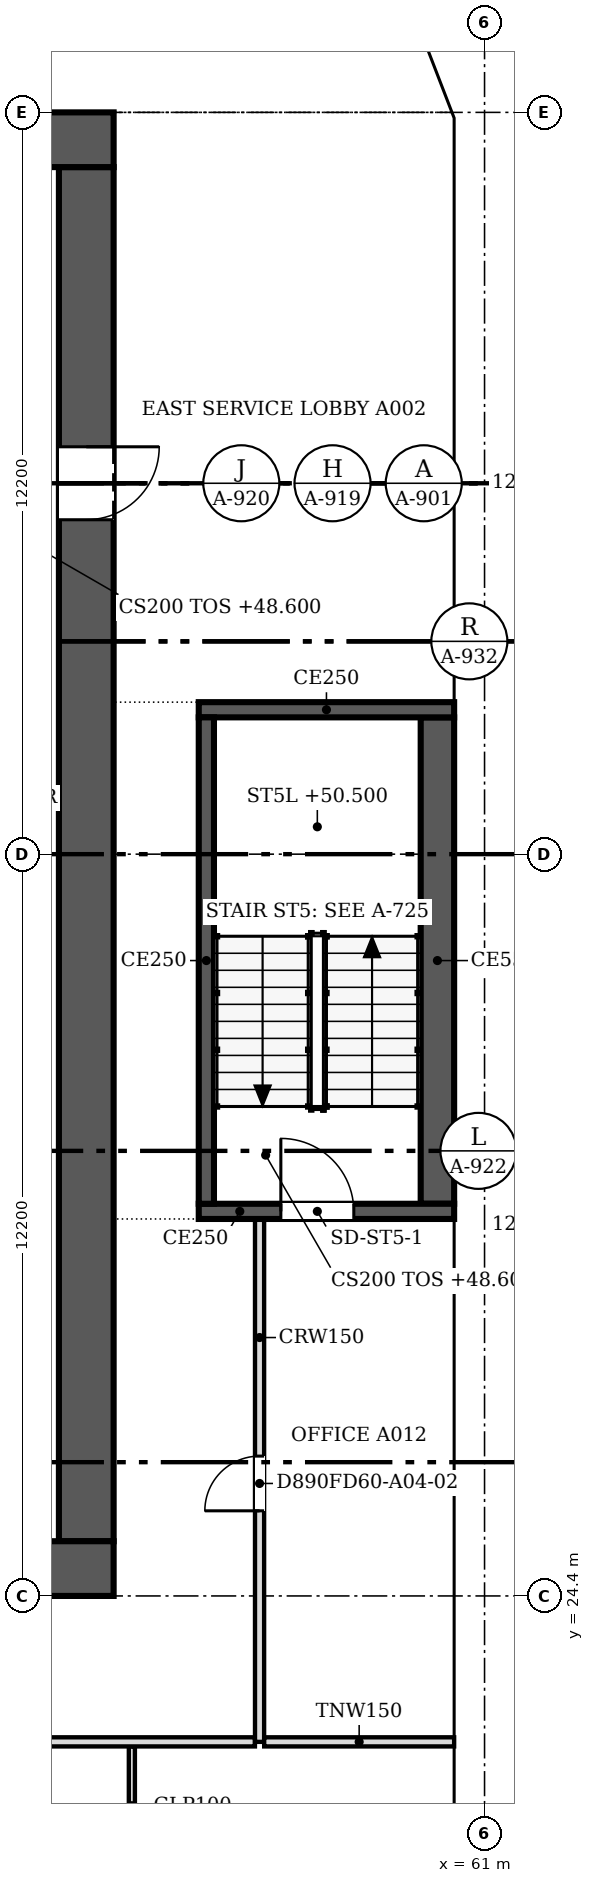
"""IFC4 building model, lengths in metres.
Left out: names, types, materials, properties, quantities, classifications, styles, units other than length and angle.
Written with IfcOpenShell. Run it as: python <this file> out.ifc"""

import sys

from ifc_helpers import new_model, si_unit, direction, frame, frame_2d, origin, place, context, subcontext, project, spatial, polyline, rectangle, outline, extrude, faceted_brep, source, transform, mapped, element, fill, save


model = new_model("IFC4")
c1 = context("Model", 3, precision=1e-05, world=origin(), true_north=direction((0.0, 1.0)))
c2 = subcontext(c1, "Body", "Model", "MODEL_VIEW")
j1 = project(units=[si_unit("LENGTHUNIT", "METRE"), si_unit("PLANEANGLEUNIT", "RADIAN")], contexts=[c1])
p1 = place(None, origin())
s1 = spatial("IfcSite", under=j1, at=p1, CompositionType="ELEMENT")
p2 = place(p1, origin())
s2 = spatial("IfcBuilding", under=s1, at=p2, CompositionType="ELEMENT")
p3 = place(p2, frame((0.0, 0.0, 48.6)))
s3 = spatial("IfcBuildingStorey", under=s2, at=p3, CompositionType="ELEMENT", Elevation=48.6)
m1 = source(origin(), c2, "Body", "Brep", [
    faceted_brep([(3.05, -0.25, 0.0), (6.1, -0.25, 3.8), (6.1, -0.25, 3.8), (3.05, -0.25, 7.6), (0.0, -0.25, 3.8), (0.0, 0.25, 3.8), (3.05, 0.25, 7.6), (6.1, 0.25, 3.8), (6.1, 0.25, 3.8), (3.05, 0.25, 0.0)], [[[0, 1, 2, 3, 4]], [[5, 6, 7, 8, 9]], [[9, 8, 1, 0]], [[7, 6, 3, 2]], [[6, 5, 4, 3]], [[5, 9, 0, 4]], [[1, 8, 7, 2]]]),
])
p4 = place(p3, frame((60.75, 18.3, -3.8), z_axis=(0.0, 0.0, 1.0), x_axis=(0.0, 1.0, 0.0)))
e1 = element("IfcWall", 1, at=p4, inside=s3, PredefinedType="SOLIDWALL", context=c2, shape_type="MappedRepresentation", body=[
    mapped(m1, transform((0.0, 0.0, 0.0), scale=1.0)),
])
m2 = source(origin(), c2, "Body", "SweptSolid", [
    extrude(outline(polyline([(3.05, 0.399), (5.78, 3.8), (3.05, 7.2), (0.321, 3.8), (3.05, 0.399)])), frame((0.0, 0.26, 0.0), z_axis=(0.0, -1.0, 0.0), x_axis=(1.0, 0.0, 0.0)), (0.0, 0.0, 1.0), 0.52),
])
p5 = place(p4, origin())
e2 = element("IfcOpeningElement", 2, at=p5, cuts=e1, PredefinedType="OPENING", context=c2, shape_type="MappedRepresentation", body=[
    mapped(m2, transform((0.0, 0.0, 0.0), scale=1.0)),
])
m3 = source(origin(), c2, "Body", "SweptSolid", [
    extrude(outline(polyline([(3.05, 0.0), (6.1, 3.8), (3.05, 7.6), (0.0, 3.8), (3.05, 0.0)])), frame((0.0, 0.25, 0.0), z_axis=(0.0, -1.0, 0.0), x_axis=(1.0, 0.0, 0.0)), (0.0, 0.0, 1.0), 0.5),
])
p6 = place(p3, frame((60.75, 24.4, -3.8), z_axis=(0.0, 0.0, 1.0), x_axis=(0.0, 1.0, 0.0)))
e3 = element("IfcWall", 3, at=p6, inside=s3, PredefinedType="SOLIDWALL", context=c2, shape_type="MappedRepresentation", body=[
    mapped(m3, transform((0.0, 0.0, 0.0), scale=1.0)),
])
p7 = place(p6, origin())
e4 = element("IfcOpeningElement", 4, at=p7, cuts=e3, PredefinedType="OPENING", context=c2, shape_type="MappedRepresentation", body=[
    mapped(m2, transform((0.0, 0.0, 0.0), scale=1.0)),
])
p8 = place(p3, frame((60.75, 30.5, -3.8), z_axis=(0.0, 0.0, 1.0), x_axis=(0.0, 1.0, 0.0)))
e5 = element("IfcWall", 5, at=p8, inside=s3, PredefinedType="SOLIDWALL", context=c2, shape_type="MappedRepresentation", body=[
    mapped(m3, transform((0.0, 0.0, 0.0), scale=1.0)),
])
p9 = place(p8, origin())
e6 = element("IfcOpeningElement", 6, at=p9, cuts=e5, PredefinedType="OPENING", context=c2, shape_type="MappedRepresentation", body=[
    mapped(m2, transform((0.0, 0.0, 0.0), scale=1.0)),
])
p10 = place(p3, frame((60.75, 36.6, -3.8), z_axis=(0.0, 0.0, 1.0), x_axis=(0.0, 1.0, 0.0)))
e7 = element("IfcWall", 7, at=p10, inside=s3, PredefinedType="SOLIDWALL", context=c2, shape_type="MappedRepresentation", body=[
    mapped(m1, transform((0.0, 0.0, 0.0), scale=1.0)),
])
p11 = place(p10, origin())
e8 = element("IfcOpeningElement", 8, at=p11, cuts=e7, PredefinedType="OPENING", context=c2, shape_type="MappedRepresentation", body=[
    mapped(m2, transform((0.0, 0.0, 0.0), scale=1.0)),
])
m4 = source(origin(), c2, "Body", "Brep", [
    faceted_brep([(3.05, -0.25, 0.0), (6.053, -0.25, 3.8), (3.05, -0.25, 7.6), (0.0, -0.25, 3.8), (0.0, 0.25, 3.8), (3.05, 0.25, 7.6), (6.007, 0.25, 3.859), (6.007, 0.25, 3.741), (3.05, 0.25, 0.0), (6.053, 0.0, 3.8)], [[[0, 1, 2, 3]], [[4, 5, 6, 7, 8]], [[8, 7, 9, 1, 0]], [[6, 5, 2, 1, 9]], [[5, 4, 3, 2]], [[4, 8, 0, 3]], [[7, 6, 9]]]),
])
p12 = place(p3, frame((60.75, 42.7, -3.8), z_axis=(0.0, 0.0, 1.0), x_axis=(0.0, 1.0, 0.0)))
e9 = element("IfcWall", 9, at=p12, inside=s3, PredefinedType="SOLIDWALL", context=c2, shape_type="MappedRepresentation", body=[
    mapped(m4, transform((0.0, 0.0, 0.0), scale=1.0)),
])
m5 = source(origin(), c2, "Body", "SweptSolid", [
    extrude(outline(polyline([(3.049, 0.401), (5.735, 3.8), (3.049, 7.199), (0.321, 3.8), (3.049, 0.401)])), frame((0.0, 0.26, 0.0), z_axis=(0.0, -1.0, 0.0), x_axis=(1.0, 0.0, 0.0)), (0.0, 0.0, 1.0), 0.52),
])
p13 = place(p12, origin())
e10 = element("IfcOpeningElement", 10, at=p13, cuts=e9, PredefinedType="OPENING", context=c2, shape_type="MappedRepresentation", body=[
    mapped(m5, transform((0.0, 0.0, 0.0), scale=1.0)),
])
m6 = source(origin(), c2, "Body", "Brep", [
    faceted_brep([(2.95, -0.25, 0.0), (3.003, -0.25, 0.068), (3.003, -0.25, 7.531), (2.95, -0.25, 7.6), (0.0, -0.25, 3.8), (0.047, 0.25, 3.86), (2.898, 0.25, 7.532), (2.898, 0.25, 0.068), (0.047, 0.25, 3.74), (2.95, 0.0, 0.0), (2.95, 0.0, 7.6), (0.0, 0.0, 3.8)], [[[0, 1, 2, 3, 4]], [[5, 6, 7, 8]], [[1, 0, 9]], [[10, 3, 2]], [[6, 5, 11, 4, 3, 10]], [[8, 7, 9, 0, 4, 11]], [[8, 11, 5]], [[1, 9, 7, 6, 10, 2]]]),
])
p14 = place(p3, frame((60.75, 48.753, -3.8), z_axis=(0.0, 0.0, 1.0), x_axis=(-0.35992665181, 0.932980602862, 0.0)))
e11 = element("IfcWall", 11, at=p14, inside=s3, PredefinedType="SOLIDWALL", context=c2, shape_type="MappedRepresentation", body=[
    mapped(m6, transform((0.0, 0.0, 0.0), scale=1.0)),
])
m7 = source(origin(), c2, "Body", "SweptSolid", [
    extrude(outline(polyline([(2.75, 6.935), (0.316, 3.8), (2.75, 0.665), (2.75, 6.935)])), frame((0.0, 0.26, 0.0), z_axis=(0.0, -1.0, 0.0), x_axis=(1.0, 0.0, 0.0)), (0.0, 0.0, 1.0), 0.52),
])
p15 = place(p14, origin())
e12 = element("IfcOpeningElement", 12, at=p15, cuts=e11, PredefinedType="OPENING", context=c2, shape_type="MappedRepresentation", body=[
    mapped(m7, transform((0.0, 0.0, 0.0), scale=1.0)),
])
p16 = place(p2, frame((0.0, 0.0, 52.4)))
s4 = spatial("IfcBuildingStorey", under=s2, at=p16, CompositionType="ELEMENT", Elevation=52.4)
m8 = source(origin(), c2, "Body", "SweptSolid", [
    extrude(outline(polyline([(3.05, 0.0), (6.1, 3.8), (3.05, 7.6), (0.0, 3.8), (3.05, 0.0)])), frame((0.0, 0.25, 0.0), z_axis=(0.0, -1.0, 0.0), x_axis=(1.0, 0.0, 0.0)), (0.0, 0.0, 1.0), 0.5),
])
p17 = place(p16, frame((60.75, 15.25, -3.8), z_axis=(0.0, 0.0, 1.0), x_axis=(0.0, 1.0, 0.0)))
e13 = element("IfcWall", 13, at=p17, inside=s4, PredefinedType="SOLIDWALL", context=c2, shape_type="MappedRepresentation", body=[
    mapped(m8, transform((0.0, 0.0, 0.0), scale=1.0)),
])
m9 = source(origin(), c2, "Body", "SweptSolid", [
    extrude(outline(polyline([(3.05, 0.399), (5.78, 3.8), (3.05, 7.2), (0.321, 3.8), (3.05, 0.399)])), frame((0.0, 0.26, 0.0), z_axis=(0.0, -1.0, 0.0), x_axis=(1.0, 0.0, 0.0)), (0.0, 0.0, 1.0), 0.52),
])
p18 = place(p17, origin())
e14 = element("IfcOpeningElement", 14, at=p18, cuts=e13, PredefinedType="OPENING", context=c2, shape_type="MappedRepresentation", body=[
    mapped(m9, transform((0.0, 0.0, 0.0), scale=1.0)),
])
m10 = source(origin(), c2, "Body", "Brep", [
    faceted_brep([(3.05, -0.25, 0.0), (6.1, -0.25, 3.8), (6.1, -0.25, 3.8), (3.05, -0.25, 7.6), (0.0, -0.25, 3.8), (0.0, 0.25, 3.8), (3.05, 0.25, 7.6), (6.1, 0.25, 3.8), (6.1, 0.25, 3.8), (3.05, 0.25, 0.0)], [[[0, 1, 2, 3, 4]], [[5, 6, 7, 8, 9]], [[9, 8, 1, 0]], [[7, 6, 3, 2]], [[6, 5, 4, 3]], [[5, 9, 0, 4]], [[1, 8, 7, 2]]]),
])
p19 = place(p16, frame((60.75, 21.35, -3.8), z_axis=(0.0, 0.0, 1.0), x_axis=(0.0, 1.0, 0.0)))
e15 = element("IfcWall", 15, at=p19, inside=s4, PredefinedType="SOLIDWALL", context=c2, shape_type="MappedRepresentation", body=[
    mapped(m10, transform((0.0, 0.0, 0.0), scale=1.0)),
])
p20 = place(p19, origin())
e16 = element("IfcOpeningElement", 16, at=p20, cuts=e15, PredefinedType="OPENING", context=c2, shape_type="MappedRepresentation", body=[
    mapped(m9, transform((0.0, 0.0, 0.0), scale=1.0)),
])
p21 = place(p16, frame((60.75, 27.45, -3.8), z_axis=(0.0, 0.0, 1.0), x_axis=(0.0, 1.0, 0.0)))
e17 = element("IfcWall", 17, at=p21, inside=s4, PredefinedType="SOLIDWALL", context=c2, shape_type="MappedRepresentation", body=[
    mapped(m8, transform((0.0, 0.0, 0.0), scale=1.0)),
])
p22 = place(p21, origin())
e18 = element("IfcOpeningElement", 18, at=p22, cuts=e17, PredefinedType="OPENING", context=c2, shape_type="MappedRepresentation", body=[
    mapped(m9, transform((0.0, 0.0, 0.0), scale=1.0)),
])
p23 = place(p16, frame((60.75, 33.55, -3.8), z_axis=(0.0, 0.0, 1.0), x_axis=(0.0, 1.0, 0.0)))
e19 = element("IfcWall", 19, at=p23, inside=s4, PredefinedType="SOLIDWALL", context=c2, shape_type="MappedRepresentation", body=[
    mapped(m10, transform((0.0, 0.0, 0.0), scale=1.0)),
])
p24 = place(p23, origin())
e20 = element("IfcOpeningElement", 20, at=p24, cuts=e19, PredefinedType="OPENING", context=c2, shape_type="MappedRepresentation", body=[
    mapped(m9, transform((0.0, 0.0, 0.0), scale=1.0)),
])
p25 = place(p16, frame((60.75, 39.65, -3.8), z_axis=(0.0, 0.0, 1.0), x_axis=(0.0, 1.0, 0.0)))
e21 = element("IfcWall", 21, at=p25, inside=s4, PredefinedType="SOLIDWALL", context=c2, shape_type="MappedRepresentation", body=[
    mapped(m8, transform((0.0, 0.0, 0.0), scale=1.0)),
])
p26 = place(p25, origin())
e22 = element("IfcOpeningElement", 22, at=p26, cuts=e21, PredefinedType="OPENING", context=c2, shape_type="MappedRepresentation", body=[
    mapped(m9, transform((0.0, 0.0, 0.0), scale=1.0)),
])
m11 = source(origin(), c2, "Body", "Brep", [
    faceted_brep([(3.003, -0.25, 0.0), (3.05, -0.25, 0.06), (3.05, -0.25, 7.54), (3.003, -0.25, 7.6), (0.0, -0.25, 3.8), (0.0, 0.25, 3.8), (2.957, 0.25, 7.541), (2.957, 0.25, 0.059), (3.003, 0.0, 0.0), (3.003, 0.0, 7.6)], [[[0, 1, 2, 3, 4]], [[5, 6, 7]], [[1, 0, 8]], [[9, 3, 2]], [[6, 5, 4, 3, 9]], [[5, 7, 8, 0, 4]], [[1, 8, 7, 6, 9, 2]]]),
])
p27 = place(p16, frame((60.75, 45.75, -3.8), z_axis=(0.0, 0.0, 1.0), x_axis=(0.0, 1.0, 0.0)))
e23 = element("IfcWall", 23, at=p27, inside=s4, PredefinedType="SOLIDWALL", context=c2, shape_type="MappedRepresentation", body=[
    mapped(m11, transform((0.0, 0.0, 0.0), scale=1.0)),
])
m12 = source(origin(), c2, "Body", "SweptSolid", [
    extrude(outline(polyline([(2.803, 6.944), (0.319, 3.8), (2.803, 0.656), (2.803, 6.944)])), frame((0.0, 0.26, 0.0), z_axis=(0.0, -1.0, 0.0), x_axis=(1.0, 0.0, 0.0)), (0.0, 0.0, 1.0), 0.52),
])
p28 = place(p27, origin())
e24 = element("IfcOpeningElement", 24, at=p28, cuts=e23, PredefinedType="OPENING", context=c2, shape_type="MappedRepresentation", body=[
    mapped(m12, transform((0.0, 0.0, 0.0), scale=1.0)),
])
m13 = source(origin(), c2, "Body", "Brep", [
    faceted_brep([(0.047, -0.25, 0.0), (2.997, -0.25, 3.8), (0.047, -0.25, 7.6), (0.0, -0.25, 7.541), (0.0, -0.25, 0.059), (0.093, 0.25, 7.54), (2.944, 0.25, 3.868), (2.944, 0.25, 3.732), (0.093, 0.25, 0.06), (2.997, 0.0, 3.8), (0.047, 0.0, 0.0), (0.047, 0.0, 7.6)], [[[0, 1, 2, 3, 4]], [[5, 6, 7, 8]], [[8, 7, 9, 1, 0, 10]], [[6, 5, 11, 2, 1, 9]], [[3, 2, 11]], [[10, 0, 4]], [[8, 10, 4, 3, 11, 5]], [[9, 7, 6]]]),
])
p29 = place(p16, frame((60.767, 48.71, -3.8), z_axis=(0.0, 0.0, 1.0), x_axis=(-0.359901446078, 0.932990326376, 0.0)))
e25 = element("IfcWall", 25, at=p29, inside=s4, PredefinedType="SOLIDWALL", context=c2, shape_type="MappedRepresentation", body=[
    mapped(m13, transform((0.0, 0.0, 0.0), scale=1.0)),
])
m14 = source(origin(), c2, "Body", "SweptSolid", [
    extrude(outline(polyline([(0.247, 0.665), (2.681, 3.8), (0.247, 6.935), (0.247, 0.665)])), frame((0.0, 0.26, 0.0), z_axis=(0.0, -1.0, 0.0), x_axis=(1.0, 0.0, 0.0)), (0.0, 0.0, 1.0), 0.52),
])
p30 = place(p29, origin())
e26 = element("IfcOpeningElement", 26, at=p30, cuts=e25, PredefinedType="OPENING", context=c2, shape_type="MappedRepresentation", body=[
    mapped(m14, transform((0.0, 0.0, 0.0), scale=1.0)),
])
p31 = place(p3, frame((54.9, 24.85, 0.0), z_axis=(0.0, 0.0, 1.0), x_axis=(-1.0, 0.0, 0.0)))
e27 = element("IfcWall", 27, at=p31, inside=s3, PredefinedType="SHEAR", context=c2, shape_type="SweptSolid", body=[
    extrude(rectangle(XDim=24.4, YDim=0.9, at=frame_2d((12.2, 0.0))), origin(), (0.0, 0.0, 1.0), 3.8),
])
m15 = source(origin(), c2, "Body", "SweptSolid", [
    extrude(rectangle(XDim=1.2, YDim=2.1, at=frame_2d((0.6, 1.05))), frame((0.0, 0.46, 0.0), z_axis=(0.0, -1.0, 0.0), x_axis=(1.0, 0.0, 0.0)), (0.0, 0.0, 1.0), 0.92),
])
p32 = place(p31, frame((1.5, 0.0, 0.0)))
e28 = element("IfcOpeningElement", 28, at=p32, cuts=e27, PredefinedType="OPENING", context=c2, shape_type="MappedRepresentation", body=[
    mapped(m15, transform((0.0, 0.0, 0.0), scale=1.0)),
])
p33 = place(p3, frame((30.5, 48.35, 0.0), z_axis=(0.0, 0.0, 1.0), x_axis=(1.0, 0.0, 0.0)))
e29 = element("IfcWall", 29, at=p33, inside=s3, PredefinedType="SHEAR", context=c2, shape_type="SweptSolid", body=[
    extrude(rectangle(XDim=24.4, YDim=0.9, at=frame_2d((12.2, 0.0))), origin(), (0.0, 0.0, 1.0), 3.8),
])
p34 = place(p3, frame((54.45, 47.9, 0.0), z_axis=(0.0, 0.0, 1.0), x_axis=(0.0, -1.0, 0.0)))
e30 = element("IfcWall", 30, at=p34, inside=s3, PredefinedType="SHEAR", context=c2, shape_type="SweptSolid", body=[
    extrude(rectangle(XDim=22.6, YDim=0.9, at=frame_2d((11.3, 0.0))), origin(), (0.0, 0.0, 1.0), 3.8),
])
p35 = place(p34, frame((4.6, 0.0, 0.0)))
e31 = element("IfcOpeningElement", 31, at=p35, cuts=e30, PredefinedType="OPENING", context=c2, shape_type="MappedRepresentation", body=[
    mapped(m15, transform((0.0, 0.0, 0.0), scale=1.0)),
])
p36 = place(p3, frame((60.5, 30.725, 0.0), z_axis=(0.0, 0.0, 1.0), x_axis=(-1.0, 0.0, 0.0)))
e32 = element("IfcWall", 32, at=p36, inside=s3, PredefinedType="SOLIDWALL", context=c2, shape_type="SweptSolid", body=[
    extrude(rectangle(XDim=4.2, YDim=0.25, at=frame_2d((2.1, 0.0))), origin(), (0.0, 0.0, 1.0), 3.8),
])
m16 = source(origin(), c2, "Body", "SweptSolid", [
    extrude(rectangle(XDim=1.2, YDim=2.1, at=frame_2d((0.6, 1.05))), frame((0.0, 0.135, 0.0), z_axis=(0.0, -1.0, 0.0), x_axis=(1.0, 0.0, 0.0)), (0.0, 0.0, 1.0), 0.27),
])
p37 = place(p36, frame((1.65, 0.0, 0.0)))
e33 = element("IfcOpeningElement", 33, at=p37, cuts=e32, PredefinedType="OPENING", context=c2, shape_type="MappedRepresentation", body=[
    mapped(m16, transform((0.0, 0.0, 0.0), scale=1.0)),
])
p38 = place(p3, frame((56.425, 30.85, 0.0), z_axis=(0.0, 0.0, 1.0), x_axis=(0.0, 1.0, 0.0)))
e34 = element("IfcWall", 34, at=p38, inside=s3, PredefinedType="SOLIDWALL", context=c2, shape_type="SweptSolid", body=[
    extrude(rectangle(XDim=8.0, YDim=0.25, at=frame_2d((4.0, 0.0))), origin(), (0.0, 0.0, 1.0), 3.8),
])
p39 = place(p3, frame((56.3, 38.975, 0.0), z_axis=(0.0, 0.0, 1.0), x_axis=(1.0, 0.0, 0.0)))
e35 = element("IfcWall", 35, at=p39, inside=s3, PredefinedType="SOLIDWALL", context=c2, shape_type="SweptSolid", body=[
    extrude(rectangle(XDim=4.2, YDim=0.25, at=frame_2d((2.1, 0.0))), origin(), (0.0, 0.0, 1.0), 3.8),
])
p40 = place(p3, frame((60.225, 38.85, 0.0), z_axis=(0.0, 0.0, 1.0), x_axis=(0.0, -1.0, 0.0)))
e36 = element("IfcWall", 36, at=p40, inside=s3, PredefinedType="SOLIDWALL", context=c2, shape_type="SweptSolid", body=[
    extrude(rectangle(XDim=8.0, YDim=0.55, at=frame_2d((4.0, 0.0))), origin(), (0.0, 0.0, 1.0), 3.8),
])
p41 = place(p3, frame((55.2, 21.924, 0.0), z_axis=(0.0, 0.0, 1.0), x_axis=(0.0, -1.0, 0.0)))
e37 = element("IfcWall", 37, at=p41, inside=s3, PredefinedType="PARTITIONING", context=c2, shape_type="SweptSolid", body=[
    extrude(rectangle(XDim=4.748, YDim=0.1, at=frame_2d((2.374, 0.0))), origin(), (0.0, 0.0, 1.0), 3.067),
])
m17 = source(origin(), c2, "Body", "SweptSolid", [
    extrude(rectangle(XDim=0.9, YDim=2.1, at=frame_2d((0.45, 1.05))), frame((0.0, 0.06, 0.0), z_axis=(0.0, -1.0, 0.0), x_axis=(1.0, 0.0, 0.0)), (0.0, 0.0, 1.0), 0.12),
])
p42 = place(p41, frame((1.948, 0.0, 0.0)))
e38 = element("IfcOpeningElement", 38, at=p42, cuts=e37, PredefinedType="OPENING", context=c2, shape_type="MappedRepresentation", body=[
    mapped(m17, transform((0.0, 0.0, 0.0), scale=1.0)),
])
p43 = place(p3, frame((46.4, 22.0, 0.0), z_axis=(0.0, 0.0, 1.0), x_axis=(1.0, 0.0, 0.0)))
e39 = element("IfcWall", 39, at=p43, inside=s3, PredefinedType="PARTITIONING", context=c2, shape_type="SweptSolid", body=[
    extrude(rectangle(XDim=10.824, YDim=0.15, at=frame_2d((5.412, 0.0))), origin(), (0.0, 0.0, 1.0), 3.067),
])
p44 = place(p3, frame((57.3, 30.6, 0.0), z_axis=(0.0, 0.0, 1.0), x_axis=(0.0, -1.0, 0.0)))
e40 = element("IfcWall", 40, at=p44, inside=s3, PredefinedType="PARTITIONING", context=c2, shape_type="SweptSolid", body=[
    extrude(rectangle(XDim=8.6, YDim=0.15, at=frame_2d((4.3, 0.0))), origin(), (0.0, 0.0, 1.0), 3.067),
])
m18 = source(origin(), c2, "Body", "SweptSolid", [
    extrude(rectangle(XDim=0.9, YDim=2.1, at=frame_2d((0.45, 1.05))), frame((0.0, 0.085, 0.0), z_axis=(0.0, -1.0, 0.0), x_axis=(1.0, 0.0, 0.0)), (0.0, 0.0, 1.0), 0.17),
])
p45 = place(p44, frame((3.9, 0.0, 0.0)))
e41 = element("IfcOpeningElement", 41, at=p45, cuts=e40, PredefinedType="OPENING", context=c2, shape_type="MappedRepresentation", body=[
    mapped(m18, transform((0.0, 0.0, 0.0), scale=1.0)),
])
p46 = place(p3, frame((57.376, 22.0, 0.0), z_axis=(0.0, 0.0, 1.0), x_axis=(1.0, 0.0, 0.0)))
e42 = element("IfcWall", 42, at=p46, inside=s3, PredefinedType="PARTITIONING", context=c2, shape_type="SweptSolid", body=[
    extrude(rectangle(XDim=3.124, YDim=0.15, at=frame_2d((1.562, 0.0))), origin(), (0.0, 0.0, 1.0), 3.067),
])
m19 = source(origin(), c2, "Body", "SweptSolid", [
    extrude(rectangle(XDim=1.2, YDim=2.1, at=frame_2d((0.6, 1.05))), frame((0.0, 0.025, 0.0), z_axis=(0.0, -1.0, 0.0), x_axis=(1.0, 0.0, 0.0)), (0.0, 0.0, 1.0), 0.05),
])
p47 = place(p35, origin())
e43 = element("IfcDoor", 43, at=p47, inside=s3, OperationType="SINGLE_SWING_LEFT", PredefinedType="DOOR", context=c2, shape_type="MappedRepresentation", body=[
    mapped(m19, transform((0.0, 0.0, 0.0), scale=1.0)),
])
fill(e31, e43)
p48 = place(p37, origin())
e44 = element("IfcDoor", 44, at=p48, inside=s3, OperationType="SINGLE_SWING_RIGHT", PredefinedType="DOOR", context=c2, shape_type="MappedRepresentation", body=[
    mapped(m19, transform((0.0, 0.0, 0.0), scale=1.0)),
])
fill(e33, e44)
m20 = source(origin(), c2, "Body", "SweptSolid", [
    extrude(rectangle(XDim=0.9, YDim=2.1, at=frame_2d((0.45, 1.05))), frame((0.0, 0.025, 0.0), z_axis=(0.0, -1.0, 0.0), x_axis=(1.0, 0.0, 0.0)), (0.0, 0.0, 1.0), 0.05),
])
p49 = place(p45, origin())
e45 = element("IfcDoor", 45, at=p49, inside=s3, OperationType="SINGLE_SWING_RIGHT", PredefinedType="DOOR", context=c2, shape_type="MappedRepresentation", body=[
    mapped(m20, transform((0.0, 0.0, 0.0), scale=1.0)),
])
fill(e41, e45)
save(model, sys.argv[1])
